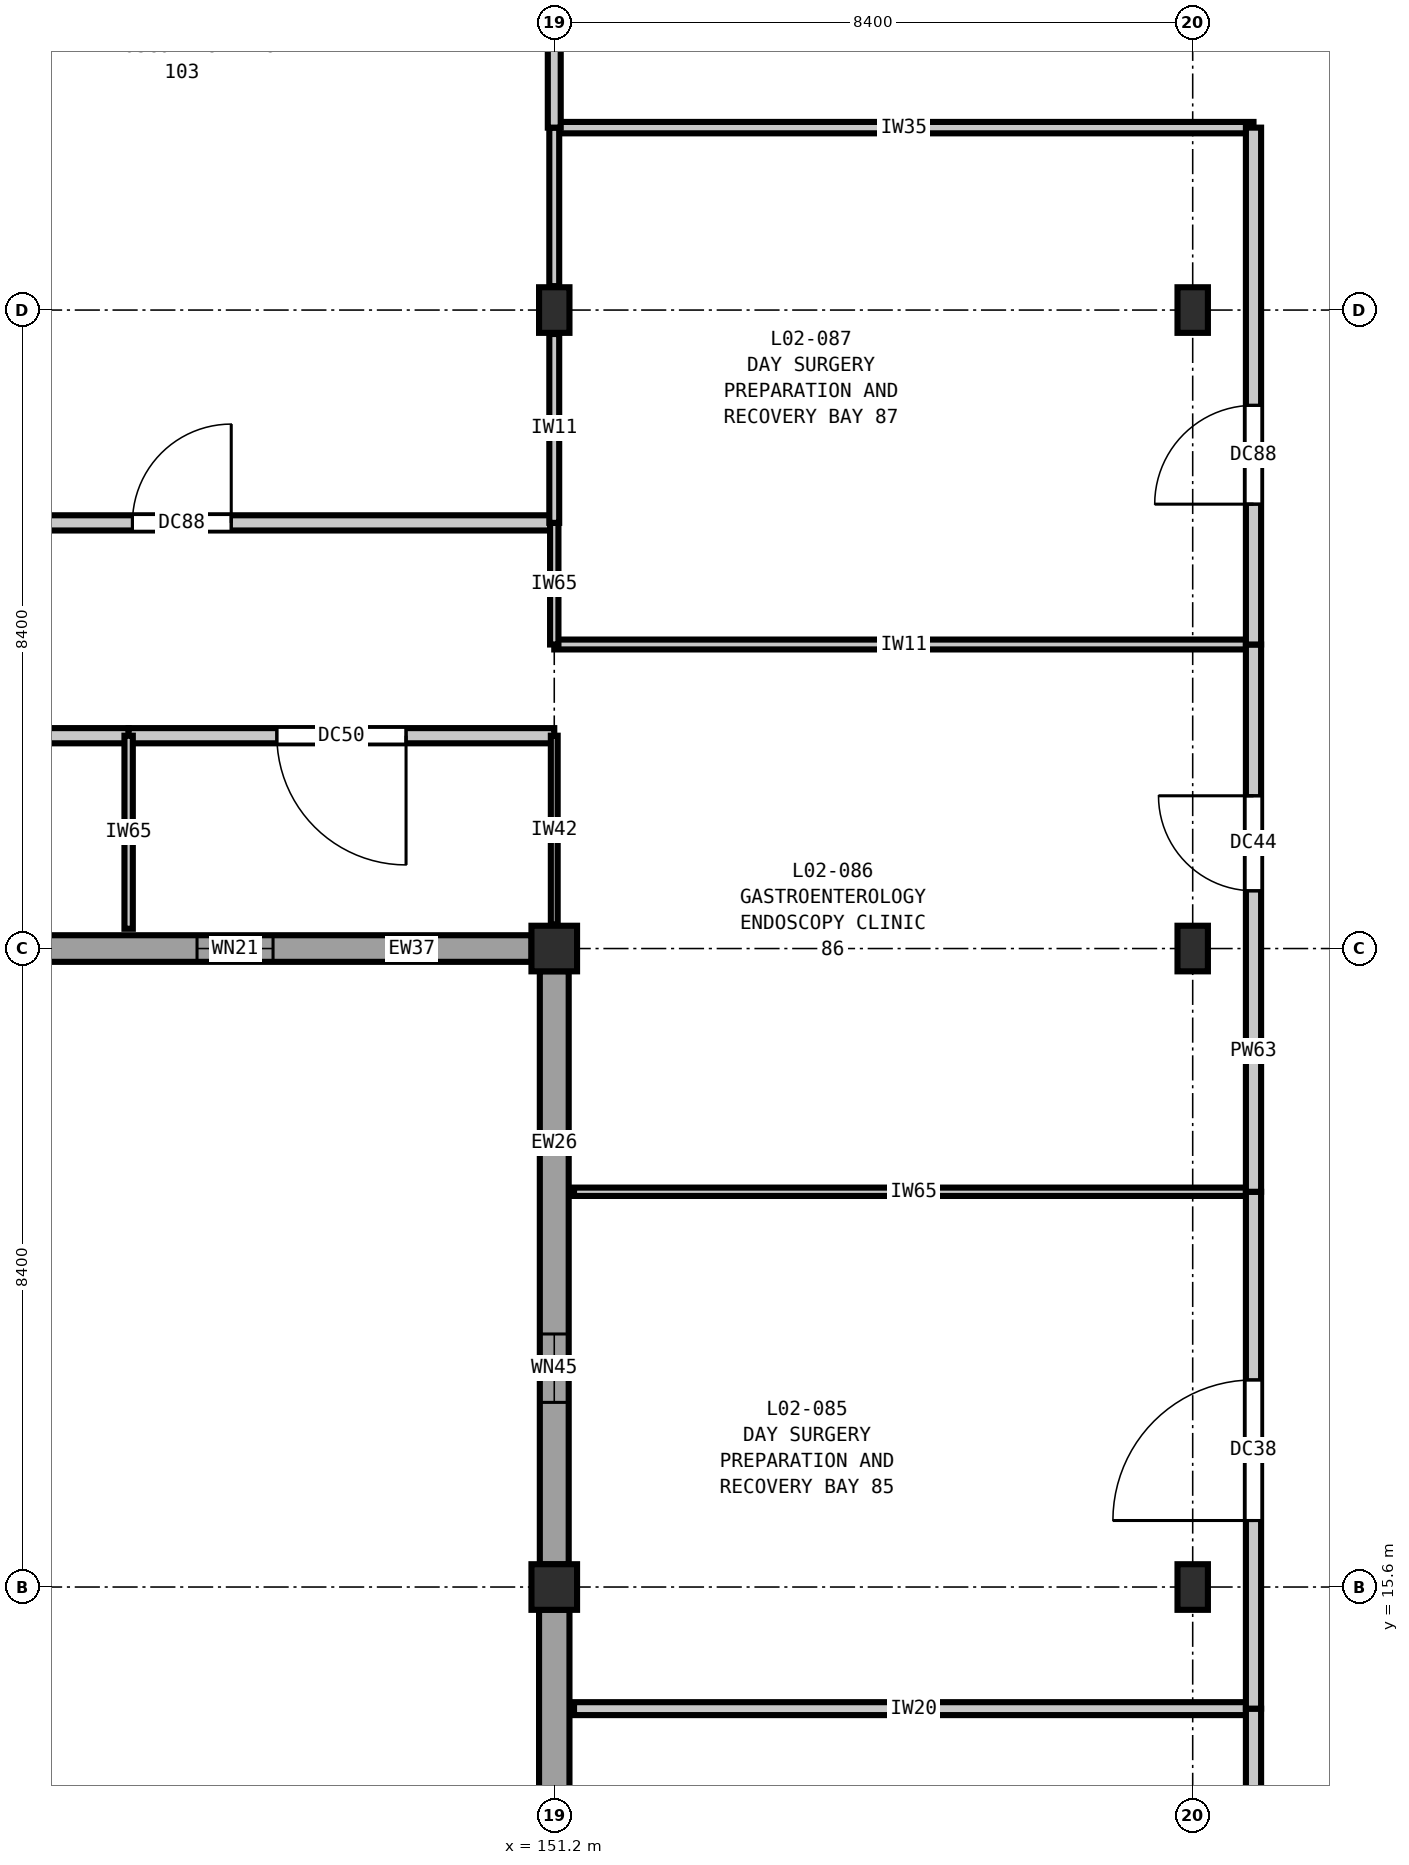
"""IFC4 building model, lengths in metres.
Left out: names, types, materials, properties, quantities, classifications, styles, units other than length and angle.
Written with IfcOpenShell. Run it as: python <this file> out.ifc"""

import sys

from ifc_helpers import new_model, si_unit, direction, frame, frame_2d, origin, origin_2d, place, context, subcontext, project, spatial, rectangle, extrude, element, fill, save


model = new_model("IFC4")
c1 = context("Model", 3, precision=1e-05, world=origin(), true_north=direction((0.0, 1.0)))
c2 = subcontext(c1, "Body", "Model", "MODEL_VIEW")
j1 = project(units=[si_unit("LENGTHUNIT", "METRE"), si_unit("PLANEANGLEUNIT", "RADIAN")], contexts=[c1])
p1 = place(None, origin())
s1 = spatial("IfcSite", under=j1, at=p1, CompositionType="ELEMENT")
p2 = place(p1, origin())
s2 = spatial("IfcBuilding", under=s1, at=p2, CompositionType="ELEMENT")
p3 = place(p2, frame((0.0, 0.0, 10.8)))
s3 = spatial("IfcBuildingStorey", under=s2, at=p3, CompositionType="ELEMENT", Elevation=10.8)
for number, where, z_axis, x_axis in (
    (1, (151.2, 15.6, 0.0), (0.0, 0.0, 1.0), (1.0, 0.0, 0.0)),
    (2, (151.2, 24.0, 0.0), (0.0, 0.0, 1.0), (1.0, 0.0, 0.0)),
):
    element("IfcColumn", number, at=place(p3, frame(where, z_axis=z_axis, x_axis=x_axis)), inside=s3, PredefinedType="COLUMN", context=c2, shape_type="SweptSolid", body=[
        extrude(rectangle(XDim=0.6, YDim=0.6, at=origin_2d()), origin(), (0.0, 0.0, 1.0), 5.4),
    ])
for number, where, z_axis, x_axis in (
    (3, (151.2, 32.4, 0.0), (0.0, 0.0, 1.0), (1.0, 0.0, 0.0)),
    (4, (159.6, 15.6, 0.0), (0.0, 0.0, 1.0), (1.0, 0.0, 0.0)),
    (5, (159.6, 24.0, 0.0), (0.0, 0.0, 1.0), (1.0, 0.0, 0.0)),
    (6, (159.6, 32.4, 0.0), (0.0, 0.0, 1.0), (1.0, 0.0, 0.0)),
):
    element("IfcColumn", number, at=place(p3, frame(where, z_axis=z_axis, x_axis=x_axis)), inside=s3, PredefinedType="COLUMN", context=c2, shape_type="SweptSolid", body=[
        extrude(rectangle(XDim=0.4, YDim=0.6, at=origin_2d()), origin(), (0.0, 0.0, 1.0), 5.4),
    ])
p4 = place(p3, frame((151.2, 7.498, 0.0), z_axis=(0.0, 0.0, 1.0), x_axis=(0.0, 1.0, 0.0)))
e7 = element("IfcWall", 7, at=p4, inside=s3, PredefinedType="SOLIDWALL", context=c2, shape_type="SweptSolid", body=[
    extrude(rectangle(XDim=7.804, YDim=0.4, at=frame_2d((3.902, 0.0))), origin(), (0.0, 0.0, 1.0), 4.68),
])
p5 = place(p4, frame((3.202, 0.0, 0.9)))
e8 = element("IfcOpeningElement", 8, at=p5, cuts=e7, PredefinedType="OPENING", context=c2, shape_type="SweptSolid", body=[
    extrude(rectangle(XDim=1.4, YDim=1.4, at=frame_2d((0.7, 0.7))), frame((0.0, 0.21, 0.0), z_axis=(0.0, -1.0, 0.0), x_axis=(1.0, 0.0, 0.0)), (0.0, 0.0, 1.0), 0.42),
])
p6 = place(p3, frame((151.2, 15.898, 0.0), z_axis=(0.0, 0.0, 1.0), x_axis=(0.0, 1.0, 0.0)))
e9 = element("IfcWall", 9, at=p6, inside=s3, PredefinedType="SOLIDWALL", context=c2, shape_type="SweptSolid", body=[
    extrude(rectangle(XDim=7.804, YDim=0.38, at=frame_2d((3.902, 0.0))), origin(), (0.0, 0.0, 1.0), 4.68),
])
p7 = place(p6, frame((2.131, 0.0, 0.9)))
e10 = element("IfcOpeningElement", 10, at=p7, cuts=e9, PredefinedType="OPENING", context=c2, shape_type="SweptSolid", body=[
    extrude(rectangle(XDim=0.9, YDim=1.55, at=frame_2d((0.45, 0.775))), frame((0.0, 0.2, 0.0), z_axis=(0.0, -1.0, 0.0), x_axis=(1.0, 0.0, 0.0)), (0.0, 0.0, 1.0), 0.4),
])
p8 = place(p3, frame((150.902, 24.0, 0.0), z_axis=(0.0, 0.0, 1.0), x_axis=(-1.0, 0.0, 0.0)))
e11 = element("IfcWall", 11, at=p8, inside=s3, PredefinedType="SOLIDWALL", context=c2, shape_type="SweptSolid", body=[
    extrude(rectangle(XDim=7.804, YDim=0.35, at=frame_2d((3.902, 0.0))), origin(), (0.0, 0.0, 1.0), 4.68),
])
p9 = place(p8, frame((3.402, 0.0, 0.9)))
e12 = element("IfcOpeningElement", 12, at=p9, cuts=e11, PredefinedType="OPENING", context=c2, shape_type="SweptSolid", body=[
    extrude(rectangle(XDim=1.0, YDim=1.55, at=frame_2d((0.5, 0.775))), frame((0.0, 0.185, 0.0), z_axis=(0.0, -1.0, 0.0), x_axis=(1.0, 0.0, 0.0)), (0.0, 0.0, 1.0), 0.37),
])
p10 = place(p3, frame((151.46, 14.0, 0.0), z_axis=(0.0, 0.0, 1.0), x_axis=(1.0, 0.0, 0.0)))
e13 = element("IfcWall", 13, at=p10, inside=s3, PredefinedType="PARTITIONING", context=c2, shape_type="SweptSolid", body=[
    extrude(rectangle(XDim=8.94, YDim=0.17, at=frame_2d((4.47, 0.0))), origin(), (0.0, 0.0, 1.0), 5.07),
])
p11 = place(p3, frame((151.46, 20.8, 0.0), z_axis=(0.0, 0.0, 1.0), x_axis=(1.0, 0.0, 0.0)))
e14 = element("IfcWall", 14, at=p11, inside=s3, PredefinedType="PARTITIONING", context=c2, shape_type="SweptSolid", body=[
    extrude(rectangle(XDim=8.94, YDim=0.11, at=frame_2d((4.47, 0.0))), origin(), (0.0, 0.0, 1.0), 5.07),
])
p12 = place(p3, frame((138.4, 26.8, 0.0), z_axis=(0.0, 0.0, 1.0), x_axis=(1.0, 0.0, 0.0)))
e15 = element("IfcWall", 15, at=p12, inside=s3, PredefinedType="PARTITIONING", context=c2, shape_type="SweptSolid", body=[
    extrude(rectangle(XDim=7.2, YDim=0.2, at=frame_2d((3.6, 0.0))), origin(), (0.0, 0.0, 1.0), 5.07),
])
p13 = place(p12, frame((2.825, 0.0, 0.0)))
e16 = element("IfcOpeningElement", 16, at=p13, cuts=e15, PredefinedType="OPENING", context=c2, shape_type="SweptSolid", body=[
    extrude(rectangle(XDim=1.55, YDim=2.25, at=frame_2d((0.775, 1.125))), frame((0.0, 0.11, 0.0), z_axis=(0.0, -1.0, 0.0), x_axis=(1.0, 0.0, 0.0)), (0.0, 0.0, 1.0), 0.22),
])
p14 = place(p3, frame((145.6, 26.8, 0.0), z_axis=(0.0, 0.0, 1.0), x_axis=(1.0, 0.0, 0.0)))
e17 = element("IfcWall", 17, at=p14, inside=s3, PredefinedType="PARTITIONING", context=c2, shape_type="SweptSolid", body=[
    extrude(rectangle(XDim=5.6, YDim=0.2, at=frame_2d((2.8, 0.0))), origin(), (0.0, 0.0, 1.0), 5.07),
])
p15 = place(p14, frame((1.95, 0.0, 0.0)))
e18 = element("IfcOpeningElement", 18, at=p15, cuts=e17, PredefinedType="OPENING", context=c2, shape_type="SweptSolid", body=[
    extrude(rectangle(XDim=1.7, YDim=2.3, at=frame_2d((0.85, 1.15))), frame((0.0, 0.11, 0.0), z_axis=(0.0, -1.0, 0.0), x_axis=(1.0, 0.0, 0.0)), (0.0, 0.0, 1.0), 0.22),
])
p16 = place(p3, frame((151.2, 28.0, 0.0), z_axis=(0.0, 0.0, 1.0), x_axis=(1.0, 0.0, 0.0)))
e19 = element("IfcWall", 19, at=p16, inside=s3, PredefinedType="PARTITIONING", context=c2, shape_type="SweptSolid", body=[
    extrude(rectangle(XDim=9.2, YDim=0.13, at=frame_2d((4.6, 0.0))), origin(), (0.0, 0.0, 1.0), 5.07),
])
p17 = place(p3, frame((141.4, 29.6, 0.0), z_axis=(0.0, 0.0, 1.0), x_axis=(1.0, 0.0, 0.0)))
e20 = element("IfcWall", 20, at=p17, inside=s3, PredefinedType="PARTITIONING", context=c2, shape_type="SweptSolid", body=[
    extrude(rectangle(XDim=9.8, YDim=0.2, at=frame_2d((4.9, 0.0))), origin(), (0.0, 0.0, 1.0), 5.07),
])
p18 = place(p17, frame((4.25, 0.0, 0.0)))
e21 = element("IfcOpeningElement", 21, at=p18, cuts=e20, PredefinedType="OPENING", context=c2, shape_type="SweptSolid", body=[
    extrude(rectangle(XDim=1.3, YDim=2.2, at=frame_2d((0.65, 1.1))), frame((0.0, 0.11, 0.0), z_axis=(0.0, -1.0, 0.0), x_axis=(1.0, 0.0, 0.0)), (0.0, 0.0, 1.0), 0.22),
])
p19 = place(p3, frame((151.2, 34.8, 0.0), z_axis=(0.0, 0.0, 1.0), x_axis=(1.0, 0.0, 0.0)))
e22 = element("IfcWall", 22, at=p19, inside=s3, PredefinedType="PARTITIONING", context=c2, shape_type="SweptSolid", body=[
    extrude(rectangle(XDim=9.2, YDim=0.15, at=frame_2d((4.6, 0.0))), origin(), (0.0, 0.0, 1.0), 5.07),
])
p20 = place(p3, frame((145.6, 24.26, 0.0), z_axis=(0.0, 0.0, 1.0), x_axis=(0.0, 1.0, 0.0)))
e23 = element("IfcWall", 23, at=p20, inside=s3, PredefinedType="PARTITIONING", context=c2, shape_type="SweptSolid", body=[
    extrude(rectangle(XDim=2.54, YDim=0.11, at=frame_2d((1.27, 0.0))), origin(), (0.0, 0.0, 1.0), 5.07),
])
p21 = place(p3, frame((151.2, 24.315, 0.0), z_axis=(0.0, 0.0, 1.0), x_axis=(0.0, 1.0, 0.0)))
e24 = element("IfcWall", 24, at=p21, inside=s3, PredefinedType="PARTITIONING", context=c2, shape_type="SweptSolid", body=[
    extrude(rectangle(XDim=2.485, YDim=0.09, at=frame_2d((1.243, 0.0))), origin(), (0.0, 0.0, 1.0), 4.735),
])
p22 = place(p3, frame((151.2, 28.0, 0.0), z_axis=(0.0, 0.0, 1.0), x_axis=(0.0, 1.0, 0.0)))
e25 = element("IfcWall", 25, at=p22, inside=s3, PredefinedType="PARTITIONING", context=c2, shape_type="SweptSolid", body=[
    extrude(rectangle(XDim=1.6, YDim=0.11, at=frame_2d((0.8, 0.0))), origin(), (0.0, 0.0, 1.0), 4.735),
])
p23 = place(p3, frame((151.2, 29.6, 0.0), z_axis=(0.0, 0.0, 1.0), x_axis=(0.0, 1.0, 0.0)))
e26 = element("IfcWall", 26, at=p23, inside=s3, PredefinedType="PARTITIONING", context=c2, shape_type="SweptSolid", body=[
    extrude(rectangle(XDim=2.485, YDim=0.13, at=frame_2d((1.242, 0.0))), origin(), (0.0, 0.0, 1.0), 4.735),
])
p24 = place(p3, frame((151.2, 32.715, 0.0), z_axis=(0.0, 0.0, 1.0), x_axis=(0.0, 1.0, 0.0)))
e27 = element("IfcWall", 27, at=p24, inside=s3, PredefinedType="PARTITIONING", context=c2, shape_type="SweptSolid", body=[
    extrude(rectangle(XDim=2.085, YDim=0.13, at=frame_2d((1.042, 0.0))), origin(), (0.0, 0.0, 1.0), 4.735),
])
p25 = place(p3, frame((151.2, 34.8, 0.0), z_axis=(0.0, 0.0, 1.0), x_axis=(0.0, 1.0, 0.0)))
e28 = element("IfcWall", 28, at=p25, inside=s3, PredefinedType="PARTITIONING", context=c2, shape_type="SweptSolid", body=[
    extrude(rectangle(XDim=5.685, YDim=0.17, at=frame_2d((2.843, 0.0))), origin(), (0.0, 0.0, 1.0), 4.735),
])
p26 = place(p3, frame((160.4, 6.8, 0.0), z_axis=(0.0, 0.0, 1.0), x_axis=(0.0, 1.0, 0.0)))
e29 = element("IfcWall", 29, at=p26, inside=s3, PredefinedType="PARTITIONING", context=c2, shape_type="SweptSolid", body=[
    extrude(rectangle(XDim=7.2, YDim=0.2, at=frame_2d((3.6, 0.0))), origin(), (0.0, 0.0, 1.0), 5.07),
])
p27 = place(p26, frame((2.75, 0.0, 0.0)))
e30 = element("IfcOpeningElement", 30, at=p27, cuts=e29, PredefinedType="OPENING", context=c2, shape_type="SweptSolid", body=[
    extrude(rectangle(XDim=1.7, YDim=2.3, at=frame_2d((0.85, 1.15))), frame((0.0, 0.11, 0.0), z_axis=(0.0, -1.0, 0.0), x_axis=(1.0, 0.0, 0.0)), (0.0, 0.0, 1.0), 0.22),
])
p28 = place(p3, frame((160.4, 14.0, 0.0), z_axis=(0.0, 0.0, 1.0), x_axis=(0.0, 1.0, 0.0)))
e31 = element("IfcWall", 31, at=p28, inside=s3, PredefinedType="PARTITIONING", context=c2, shape_type="SweptSolid", body=[
    extrude(rectangle(XDim=6.8, YDim=0.2, at=frame_2d((3.4, 0.0))), origin(), (0.0, 0.0, 1.0), 5.07),
])
p29 = place(p28, frame((2.475, 0.0, 0.0)))
e32 = element("IfcOpeningElement", 32, at=p29, cuts=e31, PredefinedType="OPENING", context=c2, shape_type="SweptSolid", body=[
    extrude(rectangle(XDim=1.85, YDim=2.3, at=frame_2d((0.925, 1.15))), frame((0.0, 0.11, 0.0), z_axis=(0.0, -1.0, 0.0), x_axis=(1.0, 0.0, 0.0)), (0.0, 0.0, 1.0), 0.22),
])
p30 = place(p3, frame((160.4, 20.8, 0.0), z_axis=(0.0, 0.0, 1.0), x_axis=(0.0, 1.0, 0.0)))
e33 = element("IfcWall", 33, at=p30, inside=s3, PredefinedType="PARTITIONING", context=c2, shape_type="SweptSolid", body=[
    extrude(rectangle(XDim=7.2, YDim=0.2, at=frame_2d((3.6, 0.0))), origin(), (0.0, 0.0, 1.0), 5.07),
])
p31 = place(p30, frame((3.96, 0.0, 0.0)))
e34 = element("IfcOpeningElement", 34, at=p31, cuts=e33, PredefinedType="OPENING", context=c2, shape_type="SweptSolid", body=[
    extrude(rectangle(XDim=1.25, YDim=2.15, at=frame_2d((0.625, 1.075))), frame((0.0, 0.11, 0.0), z_axis=(0.0, -1.0, 0.0), x_axis=(1.0, 0.0, 0.0)), (0.0, 0.0, 1.0), 0.22),
])
p32 = place(p3, frame((160.4, 28.0, 0.0), z_axis=(0.0, 0.0, 1.0), x_axis=(0.0, 1.0, 0.0)))
e35 = element("IfcWall", 35, at=p32, inside=s3, PredefinedType="PARTITIONING", context=c2, shape_type="SweptSolid", body=[
    extrude(rectangle(XDim=6.8, YDim=0.2, at=frame_2d((3.4, 0.0))), origin(), (0.0, 0.0, 1.0), 5.07),
])
p33 = place(p32, frame((1.846, 0.0, 0.0)))
e36 = element("IfcOpeningElement", 36, at=p33, cuts=e35, PredefinedType="OPENING", context=c2, shape_type="SweptSolid", body=[
    extrude(rectangle(XDim=1.3, YDim=2.2, at=frame_2d((0.65, 1.1))), frame((0.0, 0.11, 0.0), z_axis=(0.0, -1.0, 0.0), x_axis=(1.0, 0.0, 0.0)), (0.0, 0.0, 1.0), 0.22),
])
p34 = place(p7, origin())
e37 = element("IfcWindow", 37, at=p34, inside=s3, PartitioningType="SINGLE_PANEL", PredefinedType="WINDOW", context=c2, shape_type="SweptSolid", body=[
    extrude(rectangle(XDim=0.9, YDim=1.55, at=frame_2d((0.45, 0.775))), frame((0.0, 0.03, 0.0), z_axis=(0.0, -1.0, 0.0), x_axis=(1.0, 0.0, 0.0)), (0.0, 0.0, 1.0), 0.06),
])
fill(e10, e37)
p35 = place(p9, origin())
e38 = element("IfcWindow", 38, at=p35, inside=s3, PartitioningType="SINGLE_PANEL", PredefinedType="WINDOW", context=c2, shape_type="SweptSolid", body=[
    extrude(rectangle(XDim=1.0, YDim=1.55, at=frame_2d((0.5, 0.775))), frame((0.0, 0.03, 0.0), z_axis=(0.0, -1.0, 0.0), x_axis=(1.0, 0.0, 0.0)), (0.0, 0.0, 1.0), 0.06),
])
fill(e12, e38)
p36 = place(p15, frame((1.7, 0.0, 0.0), z_axis=(0.0, 0.0, 1.0), x_axis=(-1.0, 0.0, 0.0)))
e39 = element("IfcDoor", 39, at=p36, inside=s3, OperationType="SINGLE_SWING_LEFT", PredefinedType="DOOR", context=c2, shape_type="SweptSolid", body=[
    extrude(rectangle(XDim=1.7, YDim=2.3, at=frame_2d((0.85, 1.15))), frame((0.0, 0.025, 0.0), z_axis=(0.0, -1.0, 0.0), x_axis=(1.0, 0.0, 0.0)), (0.0, 0.0, 1.0), 0.05),
])
fill(e18, e39)
p37 = place(p18, origin())
e40 = element("IfcDoor", 40, at=p37, inside=s3, OperationType="SINGLE_SWING_RIGHT", PredefinedType="DOOR", context=c2, shape_type="SweptSolid", body=[
    extrude(rectangle(XDim=1.3, YDim=2.2, at=frame_2d((0.65, 1.1))), frame((0.0, 0.025, 0.0), z_axis=(0.0, -1.0, 0.0), x_axis=(1.0, 0.0, 0.0)), (0.0, 0.0, 1.0), 0.05),
])
fill(e21, e40)
p38 = place(p29, origin())
e41 = element("IfcDoor", 41, at=p38, inside=s3, OperationType="SINGLE_SWING_LEFT", PredefinedType="DOOR", context=c2, shape_type="SweptSolid", body=[
    extrude(rectangle(XDim=1.85, YDim=2.3, at=frame_2d((0.925, 1.15))), frame((0.0, 0.025, 0.0), z_axis=(0.0, -1.0, 0.0), x_axis=(1.0, 0.0, 0.0)), (0.0, 0.0, 1.0), 0.05),
])
fill(e32, e41)
p39 = place(p31, origin())
e42 = element("IfcDoor", 42, at=p39, inside=s3, OperationType="SINGLE_SWING_RIGHT", PredefinedType="DOOR", context=c2, shape_type="SweptSolid", body=[
    extrude(rectangle(XDim=1.25, YDim=2.15, at=frame_2d((0.625, 1.075))), frame((0.0, 0.025, 0.0), z_axis=(0.0, -1.0, 0.0), x_axis=(1.0, 0.0, 0.0)), (0.0, 0.0, 1.0), 0.05),
])
fill(e34, e42)
p40 = place(p33, origin())
e43 = element("IfcDoor", 43, at=p40, inside=s3, OperationType="SINGLE_SWING_LEFT", PredefinedType="DOOR", context=c2, shape_type="SweptSolid", body=[
    extrude(rectangle(XDim=1.3, YDim=2.2, at=frame_2d((0.65, 1.1))), frame((0.0, 0.025, 0.0), z_axis=(0.0, -1.0, 0.0), x_axis=(1.0, 0.0, 0.0)), (0.0, 0.0, 1.0), 0.05),
])
fill(e36, e43)
save(model, sys.argv[1])
